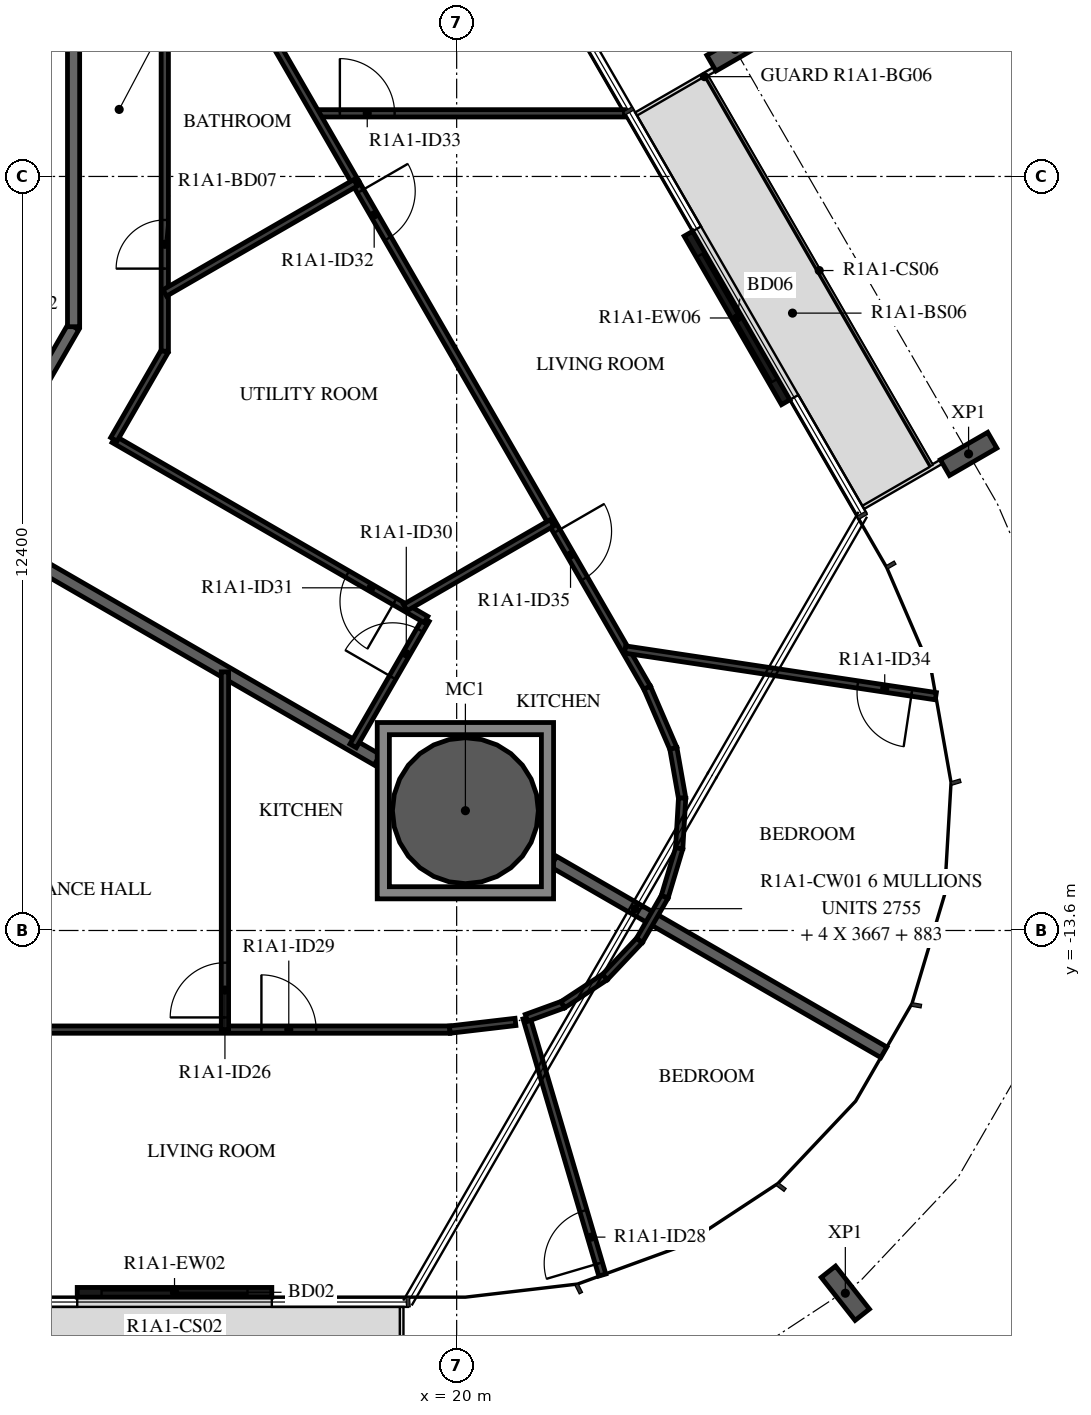
"""IFC4 building model, lengths in metres.
Left out: names, types, materials, properties, quantities, classifications, styles, units other than length and angle.
Written with IfcOpenShell. Run it as: python <this file> out.ifc"""

import sys

from ifc_helpers import new_model, si_unit, direction, frame, frame_2d, origin, origin_2d, place, context, subcontext, project, spatial, polyline, rectangle, hollow_circle, i_section, outline, extrude, element, fill, save


model = new_model("IFC4")
c1 = context("Model", 3, precision=1e-05, world=origin(), true_north=direction((0.0, 1.0)))
c2 = subcontext(c1, "Body", "Model", "MODEL_VIEW")
j1 = project(units=[si_unit("LENGTHUNIT", "METRE"), si_unit("PLANEANGLEUNIT", "RADIAN")], contexts=[c1])
p1 = place(None, origin())
s1 = spatial("IfcSite", under=j1, at=p1, CompositionType="ELEMENT")
p2 = place(p1, origin())
s2 = spatial("IfcBuilding", under=s1, at=p2, CompositionType="ELEMENT")
p3 = place(p2, frame((0.0, 0.0, 41.9)))
s3 = spatial("IfcBuildingStorey", under=s2, at=p3, CompositionType="ELEMENT", Elevation=41.9)
p4 = place(p3, frame((20.144, -11.63, -0.38), z_axis=(0.0, 0.0, 1.0), x_axis=(1.0, 0.0, 0.0)))
e1 = element("IfcColumn", 1, at=p4, inside=s3, PredefinedType="COLUMN", context=c2, shape_type="SweptSolid", body=[
    extrude(hollow_circle(Radius=1.2, WallThickness=0.06, at=origin_2d()), origin(), (0.0, 0.0, 1.0), 3.5),
])
for number, where, z_axis, x_axis in (
    (2, (26.392, -19.565, -0.38), (0.0, 0.0, 1.0), (-0.786, -0.619, 0.0)),
    (3, (28.419, -5.763, -0.38), (0.0, 0.0, 1.0), (0.5, -0.866, 0.0)),
    (4, (24.579, 0.888, -0.38), (0.0, 0.0, 1.0), (0.5, -0.866, 0.0)),
):
    element("IfcColumn", number, at=place(p3, frame(where, z_axis=z_axis, x_axis=x_axis)), inside=s3, PredefinedType="COLUMN", context=c2, shape_type="SweptSolid", body=[
        extrude(i_section(OverallWidth=0.3, OverallDepth=0.9, WebThickness=0.019, FlangeThickness=0.035, FilletRadius=0.03, at=origin_2d()), origin(), (0.0, 0.0, 1.0), 3.5),
    ])
p5 = place(p3, frame((25.411, -4.913, 0.0), z_axis=(0.0, 0.0, 1.0), x_axis=(-0.500028443584, 0.866008981251, 0.0)))
e5 = element("IfcWall", 5, at=p5, inside=s3, PredefinedType="STANDARD", context=c2, shape_type="SweptSolid", body=[
    extrude(rectangle(XDim=3.2, YDim=0.16, at=frame_2d((1.6, 0.0))), origin(), (0.0, 0.0, 1.0), 3.12),
])
p6 = place(p5, frame((0.4, 0.0, 0.0)))
e6 = element("IfcOpeningElement", 6, at=p6, cuts=e5, PredefinedType="OPENING", context=c2, shape_type="SweptSolid", body=[
    extrude(rectangle(XDim=2.4, YDim=2.4, at=frame_2d((1.2, 1.2))), frame((0.0, 0.09, 0.0), z_axis=(0.0, -1.0, 0.0), x_axis=(1.0, 0.0, 0.0)), (0.0, 0.0, 1.0), 0.18),
])
p7 = place(p3, frame((13.76, -19.55, 0.0), z_axis=(0.0, 0.0, 1.0), x_axis=(1.0, 0.0, 0.0)))
e7 = element("IfcWall", 7, at=p7, inside=s3, PredefinedType="STANDARD", context=c2, shape_type="SweptSolid", body=[
    extrude(rectangle(XDim=3.2, YDim=0.16, at=frame_2d((1.6, 0.0))), origin(), (0.0, 0.0, 1.0), 3.12),
])
p8 = place(p7, frame((0.4, 0.0, 0.0)))
e8 = element("IfcOpeningElement", 8, at=p8, cuts=e7, PredefinedType="OPENING", context=c2, shape_type="SweptSolid", body=[
    extrude(rectangle(XDim=2.4, YDim=2.4, at=frame_2d((1.2, 1.2))), frame((0.0, 0.09, 0.0), z_axis=(0.0, -1.0, 0.0), x_axis=(1.0, 0.0, 0.0)), (0.0, 0.0, 1.0), 0.18),
])
p9 = place(p3, frame((11.865, -6.849, 0.0), z_axis=(0.0, 0.0, 1.0), x_axis=(0.500002704028, 0.866023842607, 0.0)))
e9 = element("IfcWall", 9, at=p9, inside=s3, PredefinedType="STANDARD", context=c2, shape_type="SweptSolid", body=[
    extrude(rectangle(XDim=3.67, YDim=0.2, at=frame_2d((1.835, 0.0))), origin(), (0.0, 0.0, 1.0), 3.12),
])
p10 = place(p3, frame((13.7, -3.671, 0.0), z_axis=(0.0, 0.0, 1.0), x_axis=(0.0, 1.0, 0.0)))
e10 = element("IfcWall", 10, at=p10, inside=s3, PredefinedType="STANDARD", context=c2, shape_type="SweptSolid", body=[
    extrude(rectangle(XDim=7.146, YDim=0.2, at=frame_2d((3.573, 0.0))), origin(), (0.0, 0.0, 1.0), 3.12),
])
p11 = place(p10, frame((5.947, 0.0, 0.0)))
e11 = element("IfcOpeningElement", 11, at=p11, cuts=e10, PredefinedType="OPENING", context=c2, shape_type="SweptSolid", body=[
    extrude(rectangle(XDim=1.0, YDim=2.1, at=frame_2d((0.5, 1.05))), frame((0.0, 0.11, 0.0), z_axis=(0.0, -1.0, 0.0), x_axis=(1.0, 0.0, 0.0)), (0.0, 0.0, 1.0), 0.22),
])
p12 = place(p3, frame((18.694, -10.793, 0.0), z_axis=(0.0, 0.0, 1.0), x_axis=(-0.865964895271, 0.500104789178, 0.0)))
e12 = element("IfcWall", 12, at=p12, inside=s3, PredefinedType="STANDARD", context=c2, shape_type="SweptSolid", body=[
    extrude(rectangle(XDim=7.885, YDim=0.2, at=frame_2d((3.943, 0.0))), origin(), (0.0, 0.0, 1.0), 3.12),
])
p13 = place(p3, frame((27.025, -15.603, 0.0), z_axis=(0.0, 0.0, 1.0), x_axis=(-0.866030653443, 0.499990907215, 0.0)))
e13 = element("IfcWall", 13, at=p13, inside=s3, PredefinedType="STANDARD", context=c2, shape_type="SweptSolid", body=[
    extrude(rectangle(XDim=6.271, YDim=0.2, at=frame_2d((3.136, 0.0))), origin(), (0.0, 0.0, 1.0), 3.12),
])
p14 = place(p3, frame((9.124, -15.23, 0.0), z_axis=(0.0, 0.0, 1.0), x_axis=(1.0, 0.0, 0.0)))
e14 = element("IfcWall", 14, at=p14, inside=s3, PredefinedType="PARTITIONING", context=c2, shape_type="SweptSolid", body=[
    extrude(rectangle(XDim=10.764, YDim=0.12, at=frame_2d((5.382, 0.0))), origin(), (0.0, 0.0, 1.0), 3.12),
])
p15 = place(p14, frame((0.3, 0.0, 0.0)))
e15 = element("IfcOpeningElement", 15, at=p15, cuts=e14, PredefinedType="OPENING", context=c2, shape_type="SweptSolid", body=[
    extrude(rectangle(XDim=0.9, YDim=2.1, at=frame_2d((0.45, 1.05))), frame((0.0, 0.07, 0.0), z_axis=(0.0, -1.0, 0.0), x_axis=(1.0, 0.0, 0.0)), (0.0, 0.0, 1.0), 0.14),
])
p16 = place(p14, frame((7.665, 0.0, 0.0)))
e16 = element("IfcOpeningElement", 16, at=p16, cuts=e14, PredefinedType="OPENING", context=c2, shape_type="SweptSolid", body=[
    extrude(rectangle(XDim=0.9, YDim=2.1, at=frame_2d((0.45, 1.05))), frame((0.0, 0.07, 0.0), z_axis=(0.0, -1.0, 0.0), x_axis=(1.0, 0.0, 0.0)), (0.0, 0.0, 1.0), 0.14),
])
p17 = place(p3, frame((16.189, -15.23, 0.0), z_axis=(0.0, 0.0, 1.0), x_axis=(0.0, 1.0, 0.0)))
e17 = element("IfcWall", 17, at=p17, inside=s3, PredefinedType="PARTITIONING", context=c2, shape_type="SweptSolid", body=[
    extrude(rectangle(XDim=5.883, YDim=0.12, at=frame_2d((2.942, 0.0))), origin(), (0.0, 0.0, 1.0), 3.12),
])
p18 = place(p17, frame((0.2, 0.0, 0.0)))
e18 = element("IfcOpeningElement", 18, at=p18, cuts=e17, PredefinedType="OPENING", context=c2, shape_type="SweptSolid", body=[
    extrude(rectangle(XDim=0.9, YDim=2.1, at=frame_2d((0.45, 1.05))), frame((0.0, 0.07, 0.0), z_axis=(0.0, -1.0, 0.0), x_axis=(1.0, 0.0, 0.0)), (0.0, 0.0, 1.0), 0.14),
])
p19 = place(p3, frame((20.967, -15.104, 0.0), z_axis=(0.0, 0.0, 1.0), x_axis=(-0.993231641151, -0.116150363826, 0.0)))
e19 = element("IfcWall", 19, at=p19, inside=s3, PredefinedType="PARTITIONING", context=c2, shape_type="SweptSolid", body=[
    extrude(rectangle(XDim=1.087, YDim=0.12, at=frame_2d((0.543, 0.0))), origin(), (0.0, 0.0, 1.0), 3.12),
])
p20 = place(p3, frame((22.396, -19.266, 0.0), z_axis=(0.0, 0.0, 1.0), x_axis=(-0.282873823334, 0.959157130022, 0.0)))
e20 = element("IfcWall", 20, at=p20, inside=s3, PredefinedType="PARTITIONING", context=c2, shape_type="SweptSolid", body=[
    extrude(rectangle(XDim=4.409, YDim=0.12, at=frame_2d((2.204, 0.0))), origin(), (0.0, 0.0, 1.0), 3.12),
])
p21 = place(p20, frame((0.2, 0.0, 0.0)))
e21 = element("IfcOpeningElement", 21, at=p21, cuts=e20, PredefinedType="OPENING", context=c2, shape_type="SweptSolid", body=[
    extrude(rectangle(XDim=0.9, YDim=2.1, at=frame_2d((0.45, 1.05))), frame((0.0, 0.07, 0.0), z_axis=(0.0, -1.0, 0.0), x_axis=(1.0, 0.0, 0.0)), (0.0, 0.0, 1.0), 0.14),
])
p22 = place(p3, frame((21.149, -15.038, 0.0), z_axis=(0.0, 0.0, 1.0), x_axis=(0.939726102094, 0.341928140173, 0.0)))
e22 = element("IfcWall", 22, at=p22, inside=s3, PredefinedType="PARTITIONING", context=c2, shape_type="SweptSolid", body=[
    extrude(rectangle(XDim=0.635, YDim=0.12, at=frame_2d((0.318, 0.0))), origin(), (0.0, 0.0, 1.0), 3.12),
])
p23 = place(p3, frame((21.746, -14.82, 0.0), z_axis=(0.0, 0.0, 1.0), x_axis=(0.835477570013, 0.549524549046, 0.0)))
e23 = element("IfcWall", 23, at=p23, inside=s3, PredefinedType="PARTITIONING", context=c2, shape_type="SweptSolid", body=[
    extrude(rectangle(XDim=0.829, YDim=0.12, at=frame_2d((0.415, 0.0))), origin(), (0.0, 0.0, 1.0), 3.12),
])
p24 = place(p3, frame((22.438, -14.365, 0.0), z_axis=(0.0, 0.0, 1.0), x_axis=(0.686182189596, 0.727429723535, 0.0)))
e24 = element("IfcWall", 24, at=p24, inside=s3, PredefinedType="PARTITIONING", context=c2, shape_type="SweptSolid", body=[
    extrude(rectangle(XDim=0.829, YDim=0.12, at=frame_2d((0.414, 0.0))), origin(), (0.0, 0.0, 1.0), 3.12),
])
p25 = place(p3, frame((23.007, -13.762, 0.0), z_axis=(0.0, 0.0, 1.0), x_axis=(0.500002839747, 0.86602376425, 0.0)))
e25 = element("IfcWall", 25, at=p25, inside=s3, PredefinedType="PARTITIONING", context=c2, shape_type="SweptSolid", body=[
    extrude(rectangle(XDim=0.829, YDim=0.12, at=frame_2d((0.415, 0.0))), origin(), (0.0, 0.0, 1.0), 3.12),
])
p26 = place(p3, frame((18.298, -10.564, 0.0), z_axis=(0.0, 0.0, 1.0), x_axis=(0.499960392047, 0.866048270239, 0.0)))
e26 = element("IfcWall", 26, at=p26, inside=s3, PredefinedType="PARTITIONING", context=c2, shape_type="SweptSolid", body=[
    extrude(rectangle(XDim=2.398, YDim=0.12, at=frame_2d((1.199, 0.0))), origin(), (0.0, 0.0, 1.0), 3.12),
])
p27 = place(p26, frame((1.298, 0.0, 0.0)))
e27 = element("IfcOpeningElement", 27, at=p27, cuts=e26, PredefinedType="OPENING", context=c2, shape_type="SweptSolid", body=[
    extrude(rectangle(XDim=0.9, YDim=2.1, at=frame_2d((0.45, 1.05))), frame((0.0, 0.07, 0.0), z_axis=(0.0, -1.0, 0.0), x_axis=(1.0, 0.0, 0.0)), (0.0, 0.0, 1.0), 0.14),
])
p28 = place(p3, frame((19.497, -8.487, 0.0), z_axis=(0.0, 0.0, 1.0), x_axis=(-0.866027165828, 0.499996948039, 0.0)))
e28 = element("IfcWall", 28, at=p28, inside=s3, PredefinedType="PARTITIONING", context=c2, shape_type="SweptSolid", body=[
    extrude(rectangle(XDim=5.928, YDim=0.12, at=frame_2d((2.964, 0.0))), origin(), (0.0, 0.0, 1.0), 3.12),
])
p29 = place(p28, frame((0.595, 0.0, 0.0)))
e29 = element("IfcOpeningElement", 29, at=p29, cuts=e28, PredefinedType="OPENING", context=c2, shape_type="SweptSolid", body=[
    extrude(rectangle(XDim=0.9, YDim=2.1, at=frame_2d((0.45, 1.05))), frame((0.0, 0.07, 0.0), z_axis=(0.0, -1.0, 0.0), x_axis=(1.0, 0.0, 0.0)), (0.0, 0.0, 1.0), 0.14),
])
p30 = place(p3, frame((14.363, -5.523, 0.0), z_axis=(0.0, 0.0, 1.0), x_axis=(0.499995851058, 0.866027799164, 0.0)))
e30 = element("IfcWall", 30, at=p30, inside=s3, PredefinedType="PARTITIONING", context=c2, shape_type="SweptSolid", body=[
    extrude(rectangle(XDim=1.675, YDim=0.12, at=frame_2d((0.837, 0.0))), origin(), (0.0, 0.0, 1.0), 3.12),
])
p31 = place(p3, frame((15.2, -4.073, 0.0), z_axis=(0.0, 0.0, 1.0), x_axis=(0.0, 1.0, 0.0)))
e31 = element("IfcWall", 31, at=p31, inside=s3, PredefinedType="PARTITIONING", context=c2, shape_type="SweptSolid", body=[
    extrude(rectangle(XDim=8.146, YDim=0.12, at=frame_2d((4.073, 0.0))), origin(), (0.0, 0.0, 1.0), 3.12),
])
p32 = place(p31, frame((1.357, 0.0, 0.0)))
e32 = element("IfcOpeningElement", 32, at=p32, cuts=e31, PredefinedType="OPENING", context=c2, shape_type="SweptSolid", body=[
    extrude(rectangle(XDim=0.8, YDim=2.1, at=frame_2d((0.4, 1.05))), frame((0.0, 0.07, 0.0), z_axis=(0.0, -1.0, 0.0), x_axis=(1.0, 0.0, 0.0)), (0.0, 0.0, 1.0), 0.14),
])
p33 = place(p3, frame((17.679, -0.162, 0.0), z_axis=(0.0, 0.0, 1.0), x_axis=(1.0, 0.0, 0.0)))
e33 = element("IfcWall", 33, at=p33, inside=s3, PredefinedType="PARTITIONING", context=c2, shape_type="SweptSolid", body=[
    extrude(rectangle(XDim=5.081, YDim=0.12, at=frame_2d((2.54, 0.0))), origin(), (0.0, 0.0, 1.0), 3.12),
])
p34 = place(p33, frame((0.4, 0.0, 0.0)))
e34 = element("IfcOpeningElement", 34, at=p34, cuts=e33, PredefinedType="OPENING", context=c2, shape_type="SweptSolid", body=[
    extrude(rectangle(XDim=0.9, YDim=2.1, at=frame_2d((0.45, 1.05))), frame((0.0, 0.07, 0.0), z_axis=(0.0, -1.0, 0.0), x_axis=(1.0, 0.0, 0.0)), (0.0, 0.0, 1.0), 0.14),
])
p35 = place(p3, frame((15.11, 4.289, 0.0), z_axis=(0.0, 0.0, 1.0), x_axis=(0.500001702147, -0.866024421047, 0.0)))
e35 = element("IfcWall", 35, at=p35, inside=s3, PredefinedType="PARTITIONING", context=c2, shape_type="SweptSolid", body=[
    extrude(rectangle(XDim=6.458, YDim=0.12, at=frame_2d((3.229, 0.0))), origin(), (0.0, 0.0, 1.0), 3.12),
])
p36 = place(p3, frame((18.339, -1.303, 0.0), z_axis=(0.0, 0.0, 1.0), x_axis=(0.499989127021, -0.866031681211, 0.0)))
e36 = element("IfcWall", 36, at=p36, inside=s3, PredefinedType="PARTITIONING", context=c2, shape_type="SweptSolid", body=[
    extrude(rectangle(XDim=9.589, YDim=0.12, at=frame_2d((4.794, 0.0))), origin(), (0.0, 0.0, 1.0), 3.12),
])
p37 = place(p36, frame((0.16, 0.0, 0.0)))
e37 = element("IfcOpeningElement", 37, at=p37, cuts=e36, PredefinedType="OPENING", context=c2, shape_type="SweptSolid", body=[
    extrude(rectangle(XDim=0.9, YDim=2.1, at=frame_2d((0.45, 1.05))), frame((0.0, 0.07, 0.0), z_axis=(0.0, -1.0, 0.0), x_axis=(1.0, 0.0, 0.0)), (0.0, 0.0, 1.0), 0.14),
])
p38 = place(p36, frame((6.618, 0.0, 0.0)))
e38 = element("IfcOpeningElement", 38, at=p38, cuts=e36, PredefinedType="OPENING", context=c2, shape_type="SweptSolid", body=[
    extrude(rectangle(XDim=0.9, YDim=2.1, at=frame_2d((0.45, 1.05))), frame((0.0, 0.07, 0.0), z_axis=(0.0, -1.0, 0.0), x_axis=(1.0, 0.0, 0.0)), (0.0, 0.0, 1.0), 0.14),
])
p39 = place(p3, frame((23.133, -9.608, 0.0), z_axis=(0.0, 0.0, 1.0), x_axis=(0.396195073027, -0.918166359713, 0.0)))
e39 = element("IfcWall", 39, at=p39, inside=s3, PredefinedType="PARTITIONING", context=c2, shape_type="SweptSolid", body=[
    extrude(rectangle(XDim=1.087, YDim=0.12, at=frame_2d((0.543, 0.0))), origin(), (0.0, 0.0, 1.0), 3.12),
])
for number, where, z_axis, x_axis in (
    (40, (23.564, -10.606, 0.0), (0.0, 0.0, 1.0), (0.173, -0.985, 0.0)),
    (41, (23.708, -11.422, 0.0), (0.0, 0.0, 1.0), (-0.058, -0.998, 0.0)),
):
    element("IfcWall", number, at=place(p3, frame(where, z_axis=z_axis, x_axis=x_axis)), inside=s3, PredefinedType="PARTITIONING", context=c2, shape_type="SweptSolid", body=[
        extrude(rectangle(XDim=0.829, YDim=0.12, at=frame_2d((0.415, 0.0))), origin(), (0.0, 0.0, 1.0), 3.12),
    ])
p40 = place(p3, frame((23.659, -12.25, 0.0), z_axis=(0.0, 0.0, 1.0), x_axis=(-0.286834510868, -0.957980147694, 0.0)))
e42 = element("IfcWall", 42, at=p40, inside=s3, PredefinedType="PARTITIONING", context=c2, shape_type="SweptSolid", body=[
    extrude(rectangle(XDim=0.829, YDim=0.12, at=frame_2d((0.415, 0.0))), origin(), (0.0, 0.0, 1.0), 3.12),
])
p41 = place(p3, frame((27.88, -9.747, 0.0), z_axis=(0.0, 0.0, 1.0), x_axis=(-0.988899241625, 0.14858765061, 0.0)))
e43 = element("IfcWall", 43, at=p41, inside=s3, PredefinedType="PARTITIONING", context=c2, shape_type="SweptSolid", body=[
    extrude(rectangle(XDim=5.167, YDim=0.12, at=frame_2d((2.584, 0.0))), origin(), (0.0, 0.0, 1.0), 3.12),
])
p42 = place(p41, frame((0.4, 0.0, 0.0)))
e44 = element("IfcOpeningElement", 44, at=p42, cuts=e43, PredefinedType="OPENING", context=c2, shape_type="SweptSolid", body=[
    extrude(rectangle(XDim=0.9, YDim=2.1, at=frame_2d((0.45, 1.05))), frame((0.0, 0.07, 0.0), z_axis=(0.0, -1.0, 0.0), x_axis=(1.0, 0.0, 0.0)), (0.0, 0.0, 1.0), 0.14),
])
p43 = place(p3, frame((21.568, -6.896, 0.0), z_axis=(0.0, 0.0, 1.0), x_axis=(-0.866029478545, -0.499992942241, 0.0)))
e45 = element("IfcWall", 45, at=p43, inside=s3, PredefinedType="PARTITIONING", context=c2, shape_type="SweptSolid", body=[
    extrude(rectangle(XDim=2.787, YDim=0.12, at=frame_2d((1.393, 0.0))), origin(), (0.0, 0.0, 1.0), 3.12),
])
p44 = place(p3, frame((18.339, -1.303, 0.0), z_axis=(0.0, 0.0, 1.0), x_axis=(-0.866037510713, -0.499979029598, 0.0)))
e46 = element("IfcWall", 46, at=p44, inside=s3, PredefinedType="PARTITIONING", context=c2, shape_type="SweptSolid", body=[
    extrude(rectangle(XDim=3.624, YDim=0.12, at=frame_2d((1.812, 0.0))), origin(), (0.0, 0.0, 1.0), 3.12),
])
p45 = place(p3, origin())
e47 = element("IfcWall", 47, at=p45, inside=s3, PredefinedType="STANDARD", context=c2, shape_type="SweptSolid", body=[
    extrude(outline(polyline([(21.594, -10.18), (21.594, -13.08), (18.694, -13.08), (18.694, -10.18), (21.594, -10.18)]), holes=[polyline([(18.894, -12.88), (21.394, -12.88), (21.394, -10.38), (18.894, -10.38), (18.894, -12.88)])]), origin(), (0.0, 0.0, 1.0), 3.12),
])
p46 = place(p6, origin())
e48 = element("IfcDoor", 48, at=p46, inside=s3, OperationType="DOUBLE_DOOR_SLIDING", PredefinedType="DOOR", context=c2, shape_type="SweptSolid", body=[
    extrude(rectangle(XDim=2.4, YDim=2.4, at=frame_2d((1.2, 1.2))), frame((0.0, 0.025, 0.0), z_axis=(0.0, -1.0, 0.0), x_axis=(1.0, 0.0, 0.0)), (0.0, 0.0, 1.0), 0.05),
])
fill(e6, e48)
p47 = place(p8, origin())
e49 = element("IfcDoor", 49, at=p47, inside=s3, OperationType="DOUBLE_DOOR_SLIDING", PredefinedType="DOOR", context=c2, shape_type="SweptSolid", body=[
    extrude(rectangle(XDim=2.4, YDim=2.4, at=frame_2d((1.2, 1.2))), frame((0.0, 0.025, 0.0), z_axis=(0.0, -1.0, 0.0), x_axis=(1.0, 0.0, 0.0)), (0.0, 0.0, 1.0), 0.05),
])
fill(e8, e49)
p48 = place(p18, origin())
e50 = element("IfcDoor", 50, at=p48, inside=s3, OperationType="SINGLE_SWING_RIGHT", PredefinedType="DOOR", context=c2, shape_type="SweptSolid", body=[
    extrude(rectangle(XDim=0.9, YDim=2.1, at=frame_2d((0.45, 1.05))), frame((0.0, 0.025, 0.0), z_axis=(0.0, -1.0, 0.0), x_axis=(1.0, 0.0, 0.0)), (0.0, 0.0, 1.0), 0.05),
])
fill(e18, e50)
p49 = place(p21, origin())
e51 = element("IfcDoor", 51, at=p49, inside=s3, OperationType="SINGLE_SWING_RIGHT", PredefinedType="DOOR", context=c2, shape_type="SweptSolid", body=[
    extrude(rectangle(XDim=0.9, YDim=2.1, at=frame_2d((0.45, 1.05))), frame((0.0, 0.025, 0.0), z_axis=(0.0, -1.0, 0.0), x_axis=(1.0, 0.0, 0.0)), (0.0, 0.0, 1.0), 0.05),
])
fill(e21, e51)
p50 = place(p16, origin())
e52 = element("IfcDoor", 52, at=p50, inside=s3, OperationType="SINGLE_SWING_LEFT", PredefinedType="DOOR", context=c2, shape_type="SweptSolid", body=[
    extrude(rectangle(XDim=0.9, YDim=2.1, at=frame_2d((0.45, 1.05))), frame((0.0, 0.025, 0.0), z_axis=(0.0, -1.0, 0.0), x_axis=(1.0, 0.0, 0.0)), (0.0, 0.0, 1.0), 0.05),
])
fill(e16, e52)
p51 = place(p27, origin())
e53 = element("IfcDoor", 53, at=p51, inside=s3, OperationType="SINGLE_SWING_LEFT", PredefinedType="DOOR", context=c2, shape_type="SweptSolid", body=[
    extrude(rectangle(XDim=0.9, YDim=2.1, at=frame_2d((0.45, 1.05))), frame((0.0, 0.025, 0.0), z_axis=(0.0, -1.0, 0.0), x_axis=(1.0, 0.0, 0.0)), (0.0, 0.0, 1.0), 0.05),
])
fill(e27, e53)
p52 = place(p29, origin())
e54 = element("IfcDoor", 54, at=p52, inside=s3, OperationType="SINGLE_SWING_LEFT", PredefinedType="DOOR", context=c2, shape_type="SweptSolid", body=[
    extrude(rectangle(XDim=0.9, YDim=2.1, at=frame_2d((0.45, 1.05))), frame((0.0, 0.025, 0.0), z_axis=(0.0, -1.0, 0.0), x_axis=(1.0, 0.0, 0.0)), (0.0, 0.0, 1.0), 0.05),
])
fill(e29, e54)
p53 = place(p32, origin())
e55 = element("IfcDoor", 55, at=p53, inside=s3, OperationType="SINGLE_SWING_LEFT", PredefinedType="DOOR", context=c2, shape_type="SweptSolid", body=[
    extrude(rectangle(XDim=0.8, YDim=2.1, at=frame_2d((0.4, 1.05))), frame((0.0, 0.025, 0.0), z_axis=(0.0, -1.0, 0.0), x_axis=(1.0, 0.0, 0.0)), (0.0, 0.0, 1.0), 0.05),
])
fill(e32, e55)
p54 = place(p37, origin())
e56 = element("IfcDoor", 56, at=p54, inside=s3, OperationType="SINGLE_SWING_LEFT", PredefinedType="DOOR", context=c2, shape_type="SweptSolid", body=[
    extrude(rectangle(XDim=0.9, YDim=2.1, at=frame_2d((0.45, 1.05))), frame((0.0, 0.025, 0.0), z_axis=(0.0, -1.0, 0.0), x_axis=(1.0, 0.0, 0.0)), (0.0, 0.0, 1.0), 0.05),
])
fill(e37, e56)
p55 = place(p34, origin())
e57 = element("IfcDoor", 57, at=p55, inside=s3, OperationType="SINGLE_SWING_LEFT", PredefinedType="DOOR", context=c2, shape_type="SweptSolid", body=[
    extrude(rectangle(XDim=0.9, YDim=2.1, at=frame_2d((0.45, 1.05))), frame((0.0, 0.025, 0.0), z_axis=(0.0, -1.0, 0.0), x_axis=(1.0, 0.0, 0.0)), (0.0, 0.0, 1.0), 0.05),
])
fill(e34, e57)
p56 = place(p42, origin())
e58 = element("IfcDoor", 58, at=p56, inside=s3, OperationType="SINGLE_SWING_LEFT", PredefinedType="DOOR", context=c2, shape_type="SweptSolid", body=[
    extrude(rectangle(XDim=0.9, YDim=2.1, at=frame_2d((0.45, 1.05))), frame((0.0, 0.025, 0.0), z_axis=(0.0, -1.0, 0.0), x_axis=(1.0, 0.0, 0.0)), (0.0, 0.0, 1.0), 0.05),
])
fill(e44, e58)
p57 = place(p38, origin())
e59 = element("IfcDoor", 59, at=p57, inside=s3, OperationType="SINGLE_SWING_RIGHT", PredefinedType="DOOR", context=c2, shape_type="SweptSolid", body=[
    extrude(rectangle(XDim=0.9, YDim=2.1, at=frame_2d((0.45, 1.05))), frame((0.0, 0.025, 0.0), z_axis=(0.0, -1.0, 0.0), x_axis=(1.0, 0.0, 0.0)), (0.0, 0.0, 1.0), 0.05),
])
fill(e38, e59)
save(model, sys.argv[1])
